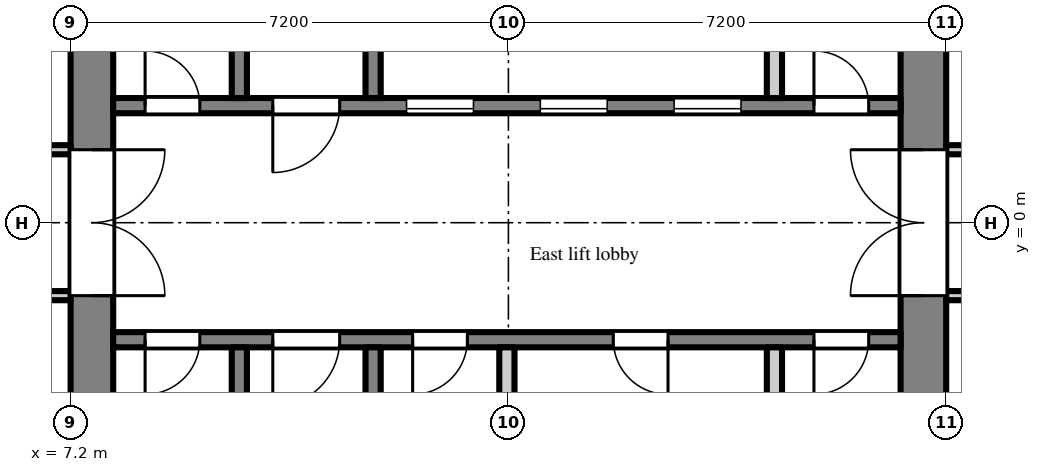
"""IFC4 building model, lengths in metres.
Left out: names, types, materials, properties, quantities, classifications, styles, units other than length and angle.
Written with IfcOpenShell. Run it as: python <this file> out.ifc"""

import sys

from ifc_helpers import new_model, si_unit, direction, frame, frame_2d, origin, place, context, subcontext, project, spatial, rectangle, extrude, element, fill, save


model = new_model("IFC4")
c1 = context("Model", 3, precision=1e-05, world=origin(), true_north=direction((0.0, 1.0)))
c2 = subcontext(c1, "Body", "Model", "MODEL_VIEW")
j1 = project(units=[si_unit("LENGTHUNIT", "METRE"), si_unit("PLANEANGLEUNIT", "RADIAN")], contexts=[c1])
p1 = place(None, origin())
s1 = spatial("IfcSite", under=j1, at=p1, CompositionType="ELEMENT")
p2 = place(p1, origin())
s2 = spatial("IfcBuilding", under=s1, at=p2, CompositionType="ELEMENT")
p3 = place(p2, frame((0.0, 0.0, 179.7)))
s3 = spatial("IfcBuildingStorey", under=s2, at=p3, CompositionType="ELEMENT", Elevation=179.7)
p4 = place(p3, frame((7.55, -7.2, 0.0), z_axis=(0.0, 0.0, 1.0), x_axis=(0.0, 1.0, 0.0)))
e1 = element("IfcWall", 1, at=p4, inside=s3, PredefinedType="SHEAR", context=c2, shape_type="SweptSolid", body=[
    extrude(rectangle(XDim=14.4, YDim=0.7, at=frame_2d((7.2, 0.0))), origin(), (0.0, 0.0, 1.0), 2.6),
])
p5 = place(p4, frame((6.0, 0.0, 0.0)))
e2 = element("IfcOpeningElement", 2, at=p5, cuts=e1, PredefinedType="OPENING", context=c2, shape_type="SweptSolid", body=[
    extrude(rectangle(XDim=2.4, YDim=2.2, at=frame_2d((1.2, 1.1))), frame((0.0, 0.36, 0.0), z_axis=(0.0, -1.0, 0.0), x_axis=(1.0, 0.0, 0.0)), (0.0, 0.0, 1.0), 0.72),
])
p6 = place(p3, frame((21.225, -7.2, 0.0), z_axis=(0.0, 0.0, 1.0), x_axis=(0.0, 1.0, 0.0)))
e3 = element("IfcWall", 3, at=p6, inside=s3, PredefinedType="SHEAR", context=c2, shape_type="SweptSolid", body=[
    extrude(rectangle(XDim=14.4, YDim=0.75, at=frame_2d((7.2, 0.0))), origin(), (0.0, 0.0, 1.0), 2.6),
])
p7 = place(p6, frame((6.0, 0.0, 0.0)))
e4 = element("IfcOpeningElement", 4, at=p7, cuts=e3, PredefinedType="OPENING", context=c2, shape_type="SweptSolid", body=[
    extrude(rectangle(XDim=2.4, YDim=2.2, at=frame_2d((1.2, 1.1))), frame((0.0, 0.385, 0.0), z_axis=(0.0, -1.0, 0.0), x_axis=(1.0, 0.0, 0.0)), (0.0, 0.0, 1.0), 0.77),
])
p8 = place(p3, frame((7.9, 1.925, 0.0), z_axis=(0.0, 0.0, 1.0), x_axis=(1.0, 0.0, 0.0)))
e5 = element("IfcWall", 5, at=p8, inside=s3, PredefinedType="SHEAR", context=c2, shape_type="SweptSolid", body=[
    extrude(rectangle(XDim=12.95, YDim=0.25, at=frame_2d((6.475, 0.0))), origin(), (0.0, 0.0, 1.0), 2.6),
])
p9 = place(p8, frame((4.825, 0.0, 0.0)))
e6 = element("IfcOpeningElement", 6, at=p9, cuts=e5, PredefinedType="OPENING", context=c2, shape_type="SweptSolid", body=[
    extrude(rectangle(XDim=1.1, YDim=2.1, at=frame_2d((0.55, 1.05))), frame((0.0, 0.135, 0.0), z_axis=(0.0, -1.0, 0.0), x_axis=(1.0, 0.0, 0.0)), (0.0, 0.0, 1.0), 0.27),
])
p10 = place(p8, frame((7.025, 0.0, 0.0)))
e7 = element("IfcOpeningElement", 7, at=p10, cuts=e5, PredefinedType="OPENING", context=c2, shape_type="SweptSolid", body=[
    extrude(rectangle(XDim=1.1, YDim=2.1, at=frame_2d((0.55, 1.05))), frame((0.0, 0.135, 0.0), z_axis=(0.0, -1.0, 0.0), x_axis=(1.0, 0.0, 0.0)), (0.0, 0.0, 1.0), 0.27),
])
p11 = place(p8, frame((9.225, 0.0, 0.0)))
e8 = element("IfcOpeningElement", 8, at=p11, cuts=e5, PredefinedType="OPENING", context=c2, shape_type="SweptSolid", body=[
    extrude(rectangle(XDim=1.1, YDim=2.1, at=frame_2d((0.55, 1.05))), frame((0.0, 0.135, 0.0), z_axis=(0.0, -1.0, 0.0), x_axis=(1.0, 0.0, 0.0)), (0.0, 0.0, 1.0), 0.27),
])
p12 = place(p8, frame((0.525, 0.0, 0.0)))
e9 = element("IfcOpeningElement", 9, at=p12, cuts=e5, PredefinedType="OPENING", context=c2, shape_type="SweptSolid", body=[
    extrude(rectangle(XDim=0.9, YDim=2.1, at=frame_2d((0.45, 1.05))), frame((0.0, 0.135, 0.0), z_axis=(0.0, -1.0, 0.0), x_axis=(1.0, 0.0, 0.0)), (0.0, 0.0, 1.0), 0.27),
])
p13 = place(p8, frame((2.625, 0.0, 0.0)))
e10 = element("IfcOpeningElement", 10, at=p13, cuts=e5, PredefinedType="OPENING", context=c2, shape_type="SweptSolid", body=[
    extrude(rectangle(XDim=1.1, YDim=2.1, at=frame_2d((0.55, 1.05))), frame((0.0, 0.135, 0.0), z_axis=(0.0, -1.0, 0.0), x_axis=(1.0, 0.0, 0.0)), (0.0, 0.0, 1.0), 0.27),
])
p14 = place(p8, frame((11.525, 0.0, 0.0)))
e11 = element("IfcOpeningElement", 11, at=p14, cuts=e5, PredefinedType="OPENING", context=c2, shape_type="SweptSolid", body=[
    extrude(rectangle(XDim=0.9, YDim=2.1, at=frame_2d((0.45, 1.05))), frame((0.0, 0.135, 0.0), z_axis=(0.0, -1.0, 0.0), x_axis=(1.0, 0.0, 0.0)), (0.0, 0.0, 1.0), 0.27),
])
p15 = place(p3, frame((9.975, 2.05, 0.0), z_axis=(0.0, 0.0, 1.0), x_axis=(0.0, 1.0, 0.0)))
e12 = element("IfcWall", 12, at=p15, inside=s3, PredefinedType="SHEAR", context=c2, shape_type="SweptSolid", body=[
    extrude(rectangle(XDim=4.75, YDim=0.25, at=frame_2d((2.375, 0.0))), origin(), (0.0, 0.0, 1.0), 2.6),
])
p16 = place(p15, frame((2.95, 0.0, 0.0)))
e13 = element("IfcOpeningElement", 13, at=p16, cuts=e12, PredefinedType="OPENING", context=c2, shape_type="SweptSolid", body=[
    extrude(rectangle(XDim=1.1, YDim=2.1, at=frame_2d((0.55, 1.05))), frame((0.0, 0.135, 0.0), z_axis=(0.0, -1.0, 0.0), x_axis=(1.0, 0.0, 0.0)), (0.0, 0.0, 1.0), 0.27),
])
p17 = place(p3, frame((12.175, 2.05, 0.0), z_axis=(0.0, 0.0, 1.0), x_axis=(0.0, 1.0, 0.0)))
e14 = element("IfcWall", 14, at=p17, inside=s3, PredefinedType="SHEAR", context=c2, shape_type="SweptSolid", body=[
    extrude(rectangle(XDim=4.75, YDim=0.25, at=frame_2d((2.375, 0.0))), origin(), (0.0, 0.0, 1.0), 2.6),
])
p18 = place(p17, frame((3.0, 0.0, 0.0)))
e15 = element("IfcOpeningElement", 15, at=p18, cuts=e14, PredefinedType="OPENING", context=c2, shape_type="SweptSolid", body=[
    extrude(rectangle(XDim=1.1, YDim=2.1, at=frame_2d((0.55, 1.05))), frame((0.0, 0.135, 0.0), z_axis=(0.0, -1.0, 0.0), x_axis=(1.0, 0.0, 0.0)), (0.0, 0.0, 1.0), 0.27),
])
p19 = place(p3, frame((18.775, 2.05, 0.0), z_axis=(0.0, 0.0, 1.0), x_axis=(0.0, 1.0, 0.0)))
e16 = element("IfcWall", 16, at=p19, inside=s3, PredefinedType="PARTITIONING", context=c2, shape_type="SweptSolid", body=[
    extrude(rectangle(XDim=2.1, YDim=0.25, at=frame_2d((1.05, 0.0))), origin(), (0.0, 0.0, 1.0), 2.6),
])
p20 = place(p3, frame((7.9, -1.925, 0.0), z_axis=(0.0, 0.0, 1.0), x_axis=(1.0, 0.0, 0.0)))
e17 = element("IfcWall", 17, at=p20, inside=s3, PredefinedType="SHEAR", context=c2, shape_type="SweptSolid", body=[
    extrude(rectangle(XDim=12.95, YDim=0.25, at=frame_2d((6.475, 0.0))), origin(), (0.0, 0.0, 1.0), 2.6),
])
p21 = place(p20, frame((0.525, 0.0, 0.0)))
e18 = element("IfcOpeningElement", 18, at=p21, cuts=e17, PredefinedType="OPENING", context=c2, shape_type="SweptSolid", body=[
    extrude(rectangle(XDim=0.9, YDim=2.1, at=frame_2d((0.45, 1.05))), frame((0.0, 0.135, 0.0), z_axis=(0.0, -1.0, 0.0), x_axis=(1.0, 0.0, 0.0)), (0.0, 0.0, 1.0), 0.27),
])
p22 = place(p20, frame((2.625, 0.0, 0.0)))
e19 = element("IfcOpeningElement", 19, at=p22, cuts=e17, PredefinedType="OPENING", context=c2, shape_type="SweptSolid", body=[
    extrude(rectangle(XDim=1.1, YDim=2.1, at=frame_2d((0.55, 1.05))), frame((0.0, 0.135, 0.0), z_axis=(0.0, -1.0, 0.0), x_axis=(1.0, 0.0, 0.0)), (0.0, 0.0, 1.0), 0.27),
])
p23 = place(p20, frame((4.925, 0.0, 0.0)))
e20 = element("IfcOpeningElement", 20, at=p23, cuts=e17, PredefinedType="OPENING", context=c2, shape_type="SweptSolid", body=[
    extrude(rectangle(XDim=0.9, YDim=2.1, at=frame_2d((0.45, 1.05))), frame((0.0, 0.135, 0.0), z_axis=(0.0, -1.0, 0.0), x_axis=(1.0, 0.0, 0.0)), (0.0, 0.0, 1.0), 0.27),
])
p24 = place(p20, frame((8.225, 0.0, 0.0)))
e21 = element("IfcOpeningElement", 21, at=p24, cuts=e17, PredefinedType="OPENING", context=c2, shape_type="SweptSolid", body=[
    extrude(rectangle(XDim=0.9, YDim=2.1, at=frame_2d((0.45, 1.05))), frame((0.0, 0.135, 0.0), z_axis=(0.0, -1.0, 0.0), x_axis=(1.0, 0.0, 0.0)), (0.0, 0.0, 1.0), 0.27),
])
p25 = place(p20, frame((11.525, 0.0, 0.0)))
e22 = element("IfcOpeningElement", 22, at=p25, cuts=e17, PredefinedType="OPENING", context=c2, shape_type="SweptSolid", body=[
    extrude(rectangle(XDim=0.9, YDim=2.1, at=frame_2d((0.45, 1.05))), frame((0.0, 0.135, 0.0), z_axis=(0.0, -1.0, 0.0), x_axis=(1.0, 0.0, 0.0)), (0.0, 0.0, 1.0), 0.27),
])
p26 = place(p3, frame((9.975, -2.05, 0.0), z_axis=(0.0, 0.0, 1.0), x_axis=(0.0, -1.0, 0.0)))
e23 = element("IfcWall", 23, at=p26, inside=s3, PredefinedType="SHEAR", context=c2, shape_type="SweptSolid", body=[
    extrude(rectangle(XDim=4.75, YDim=0.25, at=frame_2d((2.375, 0.0))), origin(), (0.0, 0.0, 1.0), 2.6),
])
p27 = place(p26, frame((2.95, 0.0, 0.0)))
e24 = element("IfcOpeningElement", 24, at=p27, cuts=e23, PredefinedType="OPENING", context=c2, shape_type="SweptSolid", body=[
    extrude(rectangle(XDim=1.1, YDim=2.1, at=frame_2d((0.55, 1.05))), frame((0.0, 0.135, 0.0), z_axis=(0.0, -1.0, 0.0), x_axis=(1.0, 0.0, 0.0)), (0.0, 0.0, 1.0), 0.27),
])
p28 = place(p3, frame((12.175, -2.05, 0.0), z_axis=(0.0, 0.0, 1.0), x_axis=(0.0, -1.0, 0.0)))
e25 = element("IfcWall", 25, at=p28, inside=s3, PredefinedType="SHEAR", context=c2, shape_type="SweptSolid", body=[
    extrude(rectangle(XDim=4.75, YDim=0.25, at=frame_2d((2.375, 0.0))), origin(), (0.0, 0.0, 1.0), 2.6),
])
p29 = place(p28, frame((3.0, 0.0, 0.0)))
e26 = element("IfcOpeningElement", 26, at=p29, cuts=e25, PredefinedType="OPENING", context=c2, shape_type="SweptSolid", body=[
    extrude(rectangle(XDim=1.1, YDim=2.1, at=frame_2d((0.55, 1.05))), frame((0.0, 0.135, 0.0), z_axis=(0.0, -1.0, 0.0), x_axis=(1.0, 0.0, 0.0)), (0.0, 0.0, 1.0), 0.27),
])
for number, where, z_axis, x_axis in (
    (27, (14.375, -2.05, 0.0), (0.0, 0.0, 1.0), (0.0, -1.0, 0.0)),
    (28, (18.775, -2.05, 0.0), (0.0, 0.0, 1.0), (0.0, -1.0, 0.0)),
):
    element("IfcWall", number, at=place(p3, frame(where, z_axis=z_axis, x_axis=x_axis)), inside=s3, PredefinedType="PARTITIONING", context=c2, shape_type="SweptSolid", body=[
        extrude(rectangle(XDim=2.1, YDim=0.25, at=frame_2d((1.05, 0.0))), origin(), (0.0, 0.0, 1.0), 2.6),
    ])
p30 = place(p3, frame((1.275, -1.2, 0.0), z_axis=(0.0, 0.0, 1.0), x_axis=(1.0, 0.0, 0.0)))
e29 = element("IfcWall", 29, at=p30, inside=s3, PredefinedType="PARTITIONING", context=c2, shape_type="SweptSolid", body=[
    extrude(rectangle(XDim=5.925, YDim=0.15, at=frame_2d((2.962, 0.0))), origin(), (0.0, 0.0, 1.0), 2.6),
])
p31 = place(p30, frame((3.475, 0.0, 0.0)))
e30 = element("IfcOpeningElement", 30, at=p31, cuts=e29, PredefinedType="OPENING", context=c2, shape_type="SweptSolid", body=[
    extrude(rectangle(XDim=0.9, YDim=2.1, at=frame_2d((0.45, 1.05))), frame((0.0, 0.085, 0.0), z_axis=(0.0, -1.0, 0.0), x_axis=(1.0, 0.0, 0.0)), (0.0, 0.0, 1.0), 0.17),
])
p32 = place(p3, frame((1.275, 1.2, 0.0), z_axis=(0.0, 0.0, 1.0), x_axis=(1.0, 0.0, 0.0)))
e31 = element("IfcWall", 31, at=p32, inside=s3, PredefinedType="PARTITIONING", context=c2, shape_type="SweptSolid", body=[
    extrude(rectangle(XDim=5.925, YDim=0.15, at=frame_2d((2.962, 0.0))), origin(), (0.0, 0.0, 1.0), 2.6),
])
p33 = place(p32, frame((0.675, 0.0, 0.0)))
e32 = element("IfcOpeningElement", 32, at=p33, cuts=e31, PredefinedType="OPENING", context=c2, shape_type="SweptSolid", body=[
    extrude(rectangle(XDim=0.9, YDim=2.1, at=frame_2d((0.45, 1.05))), frame((0.0, 0.085, 0.0), z_axis=(0.0, -1.0, 0.0), x_axis=(1.0, 0.0, 0.0)), (0.0, 0.0, 1.0), 0.17),
])
p34 = place(p32, frame((3.075, 0.0, 0.0)))
e33 = element("IfcOpeningElement", 33, at=p34, cuts=e31, PredefinedType="OPENING", context=c2, shape_type="SweptSolid", body=[
    extrude(rectangle(XDim=0.9, YDim=2.1, at=frame_2d((0.45, 1.05))), frame((0.0, 0.085, 0.0), z_axis=(0.0, -1.0, 0.0), x_axis=(1.0, 0.0, 0.0)), (0.0, 0.0, 1.0), 0.17),
])
p35 = place(p3, frame((21.6, -1.2, 0.0), z_axis=(0.0, 0.0, 1.0), x_axis=(1.0, 0.0, 0.0)))
e34 = element("IfcWall", 34, at=p35, inside=s3, PredefinedType="PARTITIONING", context=c2, shape_type="SweptSolid", body=[
    extrude(rectangle(XDim=5.125, YDim=0.15, at=frame_2d((2.562, 0.0))), origin(), (0.0, 0.0, 1.0), 2.6),
])
p36 = place(p35, frame((0.45, 0.0, 0.0)))
e35 = element("IfcOpeningElement", 35, at=p36, cuts=e34, PredefinedType="OPENING", context=c2, shape_type="SweptSolid", body=[
    extrude(rectangle(XDim=0.9, YDim=2.1, at=frame_2d((0.45, 1.05))), frame((0.0, 0.085, 0.0), z_axis=(0.0, -1.0, 0.0), x_axis=(1.0, 0.0, 0.0)), (0.0, 0.0, 1.0), 0.17),
])
p37 = place(p35, frame((2.25, 0.0, 0.0)))
e36 = element("IfcOpeningElement", 36, at=p37, cuts=e34, PredefinedType="OPENING", context=c2, shape_type="SweptSolid", body=[
    extrude(rectangle(XDim=0.9, YDim=2.1, at=frame_2d((0.45, 1.05))), frame((0.0, 0.085, 0.0), z_axis=(0.0, -1.0, 0.0), x_axis=(1.0, 0.0, 0.0)), (0.0, 0.0, 1.0), 0.17),
])
p38 = place(p35, frame((3.95, 0.0, 0.0)))
e37 = element("IfcOpeningElement", 37, at=p38, cuts=e34, PredefinedType="OPENING", context=c2, shape_type="SweptSolid", body=[
    extrude(rectangle(XDim=0.9, YDim=2.1, at=frame_2d((0.45, 1.05))), frame((0.0, 0.085, 0.0), z_axis=(0.0, -1.0, 0.0), x_axis=(1.0, 0.0, 0.0)), (0.0, 0.0, 1.0), 0.17),
])
p39 = place(p3, frame((21.6, 1.2, 0.0), z_axis=(0.0, 0.0, 1.0), x_axis=(1.0, 0.0, 0.0)))
e38 = element("IfcWall", 38, at=p39, inside=s3, PredefinedType="PARTITIONING", context=c2, shape_type="SweptSolid", body=[
    extrude(rectangle(XDim=5.125, YDim=0.15, at=frame_2d((2.562, 0.0))), origin(), (0.0, 0.0, 1.0), 2.6),
])
p40 = place(p39, frame((0.6, 0.0, 0.0)))
e39 = element("IfcOpeningElement", 39, at=p40, cuts=e38, PredefinedType="OPENING", context=c2, shape_type="SweptSolid", body=[
    extrude(rectangle(XDim=1.0, YDim=2.1, at=frame_2d((0.5, 1.05))), frame((0.0, 0.085, 0.0), z_axis=(0.0, -1.0, 0.0), x_axis=(1.0, 0.0, 0.0)), (0.0, 0.0, 1.0), 0.17),
])
p41 = place(p39, frame((3.95, 0.0, 0.0)))
e40 = element("IfcOpeningElement", 40, at=p41, cuts=e38, PredefinedType="OPENING", context=c2, shape_type="SweptSolid", body=[
    extrude(rectangle(XDim=0.9, YDim=2.1, at=frame_2d((0.45, 1.05))), frame((0.0, 0.085, 0.0), z_axis=(0.0, -1.0, 0.0), x_axis=(1.0, 0.0, 0.0)), (0.0, 0.0, 1.0), 0.17),
])
p42 = place(p9, origin())
e41 = element("IfcDoor", 41, at=p42, inside=s3, OperationType="SLIDING_TO_LEFT", PredefinedType="DOOR", context=c2, shape_type="SweptSolid", body=[
    extrude(rectangle(XDim=1.1, YDim=2.1, at=frame_2d((0.55, 1.05))), frame((0.0, 0.025, 0.0), z_axis=(0.0, -1.0, 0.0), x_axis=(1.0, 0.0, 0.0)), (0.0, 0.0, 1.0), 0.05),
])
fill(e6, e41)
p43 = place(p10, origin())
e42 = element("IfcDoor", 42, at=p43, inside=s3, OperationType="SLIDING_TO_LEFT", PredefinedType="DOOR", context=c2, shape_type="SweptSolid", body=[
    extrude(rectangle(XDim=1.1, YDim=2.1, at=frame_2d((0.55, 1.05))), frame((0.0, 0.025, 0.0), z_axis=(0.0, -1.0, 0.0), x_axis=(1.0, 0.0, 0.0)), (0.0, 0.0, 1.0), 0.05),
])
fill(e7, e42)
p44 = place(p11, origin())
e43 = element("IfcDoor", 43, at=p44, inside=s3, OperationType="SLIDING_TO_LEFT", PredefinedType="DOOR", context=c2, shape_type="SweptSolid", body=[
    extrude(rectangle(XDim=1.1, YDim=2.1, at=frame_2d((0.55, 1.05))), frame((0.0, 0.025, 0.0), z_axis=(0.0, -1.0, 0.0), x_axis=(1.0, 0.0, 0.0)), (0.0, 0.0, 1.0), 0.05),
])
fill(e8, e43)
p45 = place(p12, origin())
e44 = element("IfcDoor", 44, at=p45, inside=s3, OperationType="SINGLE_SWING_LEFT", PredefinedType="DOOR", context=c2, shape_type="SweptSolid", body=[
    extrude(rectangle(XDim=0.9, YDim=2.1, at=frame_2d((0.45, 1.05))), frame((0.0, 0.025, 0.0), z_axis=(0.0, -1.0, 0.0), x_axis=(1.0, 0.0, 0.0)), (0.0, 0.0, 1.0), 0.05),
])
fill(e9, e44)
p46 = place(p21, frame((0.9, 0.0, 0.0), z_axis=(0.0, 0.0, 1.0), x_axis=(-1.0, 0.0, 0.0)))
e45 = element("IfcDoor", 45, at=p46, inside=s3, OperationType="SINGLE_SWING_RIGHT", PredefinedType="DOOR", context=c2, shape_type="SweptSolid", body=[
    extrude(rectangle(XDim=0.9, YDim=2.1, at=frame_2d((0.45, 1.05))), frame((0.0, 0.025, 0.0), z_axis=(0.0, -1.0, 0.0), x_axis=(1.0, 0.0, 0.0)), (0.0, 0.0, 1.0), 0.05),
])
fill(e18, e45)
p47 = place(p13, frame((1.1, 0.0, 0.0), z_axis=(0.0, 0.0, 1.0), x_axis=(-1.0, 0.0, 0.0)))
e46 = element("IfcDoor", 46, at=p47, inside=s3, OperationType="SINGLE_SWING_RIGHT", PredefinedType="DOOR", context=c2, shape_type="SweptSolid", body=[
    extrude(rectangle(XDim=1.1, YDim=2.1, at=frame_2d((0.55, 1.05))), frame((0.0, 0.025, 0.0), z_axis=(0.0, -1.0, 0.0), x_axis=(1.0, 0.0, 0.0)), (0.0, 0.0, 1.0), 0.05),
])
fill(e10, e46)
p48 = place(p22, frame((1.1, 0.0, 0.0), z_axis=(0.0, 0.0, 1.0), x_axis=(-1.0, 0.0, 0.0)))
e47 = element("IfcDoor", 47, at=p48, inside=s3, OperationType="SINGLE_SWING_RIGHT", PredefinedType="DOOR", context=c2, shape_type="SweptSolid", body=[
    extrude(rectangle(XDim=1.1, YDim=2.1, at=frame_2d((0.55, 1.05))), frame((0.0, 0.025, 0.0), z_axis=(0.0, -1.0, 0.0), x_axis=(1.0, 0.0, 0.0)), (0.0, 0.0, 1.0), 0.05),
])
fill(e19, e47)
p49 = place(p5, frame((2.4, 0.0, 0.0), z_axis=(0.0, 0.0, 1.0), x_axis=(-1.0, 0.0, 0.0)))
e48 = element("IfcDoor", 48, at=p49, inside=s3, OperationType="DOUBLE_DOOR_DOUBLE_SWING", PredefinedType="DOOR", context=c2, shape_type="SweptSolid", body=[
    extrude(rectangle(XDim=2.4, YDim=2.2, at=frame_2d((1.2, 1.1))), frame((0.0, 0.025, 0.0), z_axis=(0.0, -1.0, 0.0), x_axis=(1.0, 0.0, 0.0)), (0.0, 0.0, 1.0), 0.05),
])
fill(e2, e48)
p50 = place(p7, origin())
e49 = element("IfcDoor", 49, at=p50, inside=s3, OperationType="DOUBLE_DOOR_DOUBLE_SWING", PredefinedType="DOOR", context=c2, shape_type="SweptSolid", body=[
    extrude(rectangle(XDim=2.4, YDim=2.2, at=frame_2d((1.2, 1.1))), frame((0.0, 0.025, 0.0), z_axis=(0.0, -1.0, 0.0), x_axis=(1.0, 0.0, 0.0)), (0.0, 0.0, 1.0), 0.05),
])
fill(e4, e49)
p51 = place(p14, origin())
e50 = element("IfcDoor", 50, at=p51, inside=s3, OperationType="SINGLE_SWING_LEFT", PredefinedType="DOOR", context=c2, shape_type="SweptSolid", body=[
    extrude(rectangle(XDim=0.9, YDim=2.1, at=frame_2d((0.45, 1.05))), frame((0.0, 0.025, 0.0), z_axis=(0.0, -1.0, 0.0), x_axis=(1.0, 0.0, 0.0)), (0.0, 0.0, 1.0), 0.05),
])
fill(e11, e50)
p52 = place(p23, frame((0.9, 0.0, 0.0), z_axis=(0.0, 0.0, 1.0), x_axis=(-1.0, 0.0, 0.0)))
e51 = element("IfcDoor", 51, at=p52, inside=s3, OperationType="SINGLE_SWING_RIGHT", PredefinedType="DOOR", context=c2, shape_type="SweptSolid", body=[
    extrude(rectangle(XDim=0.9, YDim=2.1, at=frame_2d((0.45, 1.05))), frame((0.0, 0.025, 0.0), z_axis=(0.0, -1.0, 0.0), x_axis=(1.0, 0.0, 0.0)), (0.0, 0.0, 1.0), 0.05),
])
fill(e20, e51)
p53 = place(p24, frame((0.9, 0.0, 0.0), z_axis=(0.0, 0.0, 1.0), x_axis=(-1.0, 0.0, 0.0)))
e52 = element("IfcDoor", 52, at=p53, inside=s3, OperationType="SINGLE_SWING_LEFT", PredefinedType="DOOR", context=c2, shape_type="SweptSolid", body=[
    extrude(rectangle(XDim=0.9, YDim=2.1, at=frame_2d((0.45, 1.05))), frame((0.0, 0.025, 0.0), z_axis=(0.0, -1.0, 0.0), x_axis=(1.0, 0.0, 0.0)), (0.0, 0.0, 1.0), 0.05),
])
fill(e21, e52)
p54 = place(p25, frame((0.9, 0.0, 0.0), z_axis=(0.0, 0.0, 1.0), x_axis=(-1.0, 0.0, 0.0)))
e53 = element("IfcDoor", 53, at=p54, inside=s3, OperationType="SINGLE_SWING_RIGHT", PredefinedType="DOOR", context=c2, shape_type="SweptSolid", body=[
    extrude(rectangle(XDim=0.9, YDim=2.1, at=frame_2d((0.45, 1.05))), frame((0.0, 0.025, 0.0), z_axis=(0.0, -1.0, 0.0), x_axis=(1.0, 0.0, 0.0)), (0.0, 0.0, 1.0), 0.05),
])
fill(e22, e53)
save(model, sys.argv[1])
